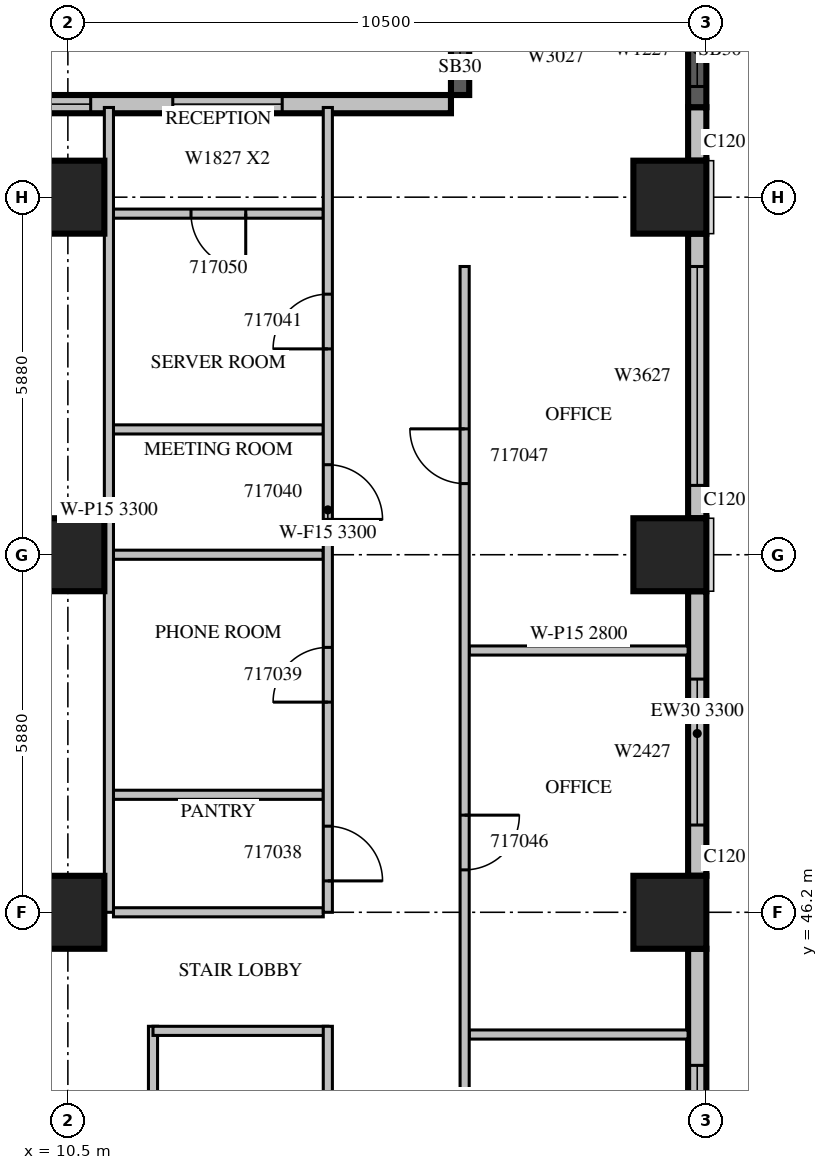
"""IFC4 building model, lengths in metres.
Left out: names, types, materials, properties, quantities, classifications, styles, units other than length and angle.
Written with IfcOpenShell. Run it as: python <this file> out.ifc"""

import sys

from ifc_helpers import new_model, si_unit, direction, frame, frame_2d, origin, origin_2d, place, context, subcontext, project, spatial, rectangle, extrude, source, transform, mapped, element, fill, save


model = new_model("IFC4")
c1 = context("Model", 3, precision=1e-05, world=origin(), true_north=direction((0.0, 1.0)))
c2 = subcontext(c1, "Body", "Model", "MODEL_VIEW")
j1 = project(units=[si_unit("LENGTHUNIT", "METRE"), si_unit("PLANEANGLEUNIT", "RADIAN")], contexts=[c1])
p1 = place(None, origin())
s1 = spatial("IfcSite", under=j1, at=p1, CompositionType="ELEMENT")
p2 = place(p1, origin())
s2 = spatial("IfcBuilding", under=s1, at=p2, CompositionType="ELEMENT")
p3 = place(p2, frame((0.0, 0.0, 82.5)))
s3 = spatial("IfcBuildingStorey", under=s2, at=p3, CompositionType="ELEMENT", Elevation=82.5)
m1 = source(origin(), c2, "Body", "SweptSolid", [
    extrude(rectangle(XDim=1.2, YDim=1.2, at=origin_2d()), origin(), (0.0, 0.0, 1.0), 4.2),
])
for number, where, z_axis, x_axis in (
    (1, (10.5, 46.2, 0.0), (0.0, 0.0, 1.0), (1.0, 0.0, 0.0)),
    (2, (20.4, 46.2, 0.0), (0.0, 0.0, 1.0), (1.0, 0.0, 0.0)),
    (3, (10.5, 52.08, 0.0), (0.0, 0.0, 1.0), (1.0, 0.0, 0.0)),
    (4, (20.4, 52.08, 0.0), (0.0, 0.0, 1.0), (1.0, 0.0, 0.0)),
    (5, (10.5, 57.96, 0.0), (0.0, 0.0, 1.0), (1.0, 0.0, 0.0)),
    (6, (20.4, 57.96, 0.0), (0.0, 0.0, 1.0), (1.0, 0.0, 0.0)),
):
    element("IfcColumn", number, at=place(p3, frame(where, z_axis=z_axis, x_axis=x_axis)), inside=s3, PredefinedType="COLUMN", context=c2, shape_type="MappedRepresentation", body=[
        mapped(m1, transform((0.0, 0.0, 0.0), scale=1.0)),
    ])
m2 = source(origin(), c2, "Body", "SweptSolid", [
    extrude(rectangle(XDim=7.2, YDim=0.3, at=frame_2d((3.6, 0.0))), origin(), (0.0, 0.0, 1.0), 3.8),
])
p4 = place(p3, frame((20.85, 38.4, 0.0), z_axis=(0.0, 0.0, 1.0), x_axis=(0.0, 1.0, 0.0)))
e7 = element("IfcWall", 7, at=p4, inside=s3, PredefinedType="STANDARD", context=c2, shape_type="MappedRepresentation", body=[
    mapped(m2, transform((0.0, 0.0, 0.0), scale=1.0)),
])
m3 = source(origin(), c2, "Body", "SweptSolid", [
    extrude(rectangle(XDim=2.4, YDim=2.7, at=frame_2d((1.2, 1.35))), frame((0.0, 0.16, 0.0), z_axis=(0.0, -1.0, 0.0), x_axis=(1.0, 0.0, 0.0)), (0.0, 0.0, 1.0), 0.32),
])
p5 = place(p4, frame((0.3, 0.0, 0.6)))
e8 = element("IfcOpeningElement", 8, at=p5, cuts=e7, PredefinedType="OPENING", context=c2, shape_type="MappedRepresentation", body=[
    mapped(m3, transform((0.0, 0.0, 0.0), scale=1.0)),
])
m4 = source(origin(), c2, "Body", "SweptSolid", [
    extrude(rectangle(XDim=1.2, YDim=2.7, at=frame_2d((0.6, 1.35))), frame((0.0, 0.16, 0.0), z_axis=(0.0, -1.0, 0.0), x_axis=(1.0, 0.0, 0.0)), (0.0, 0.0, 1.0), 0.32),
])
p6 = place(p4, frame((4.082, 0.0, 0.6)))
e9 = element("IfcOpeningElement", 9, at=p6, cuts=e7, PredefinedType="OPENING", context=c2, shape_type="MappedRepresentation", body=[
    mapped(m4, transform((0.0, 0.0, 0.0), scale=1.0)),
])
m5 = source(origin(), c2, "Body", "SweptSolid", [
    extrude(rectangle(XDim=4.68, YDim=0.3, at=frame_2d((2.34, 0.0))), origin(), (0.0, 0.0, 1.0), 3.3),
])
p7 = place(p3, frame((20.85, 46.8, 0.0), z_axis=(0.0, 0.0, 1.0), x_axis=(0.0, 1.0, 0.0)))
e10 = element("IfcWall", 10, at=p7, inside=s3, PredefinedType="STANDARD", context=c2, shape_type="MappedRepresentation", body=[
    mapped(m5, transform((0.0, 0.0, 0.0), scale=1.0)),
])
p8 = place(p7, frame((0.835, 0.0, 0.6)))
e11 = element("IfcOpeningElement", 11, at=p8, cuts=e10, PredefinedType="OPENING", context=c2, shape_type="MappedRepresentation", body=[
    mapped(m3, transform((0.0, 0.0, 0.0), scale=1.0)),
])
m6 = source(origin(), c2, "Body", "SweptSolid", [
    extrude(rectangle(XDim=4.68, YDim=0.3, at=frame_2d((2.34, 0.0))), origin(), (0.0, 0.0, 1.0), 3.8),
])
p9 = place(p3, frame((20.85, 52.68, 0.0), z_axis=(0.0, 0.0, 1.0), x_axis=(0.0, 1.0, 0.0)))
e12 = element("IfcWall", 12, at=p9, inside=s3, PredefinedType="STANDARD", context=c2, shape_type="MappedRepresentation", body=[
    mapped(m6, transform((0.0, 0.0, 0.0), scale=1.0)),
])
m7 = source(origin(), c2, "Body", "SweptSolid", [
    extrude(rectangle(XDim=3.6, YDim=2.7, at=frame_2d((1.8, 1.35))), frame((0.0, 0.16, 0.0), z_axis=(0.0, -1.0, 0.0), x_axis=(1.0, 0.0, 0.0)), (0.0, 0.0, 1.0), 0.32),
])
p10 = place(p9, frame((0.54, 0.0, 0.6)))
e13 = element("IfcOpeningElement", 13, at=p10, cuts=e12, PredefinedType="OPENING", context=c2, shape_type="MappedRepresentation", body=[
    mapped(m7, transform((0.0, 0.0, 0.0), scale=1.0)),
])
m8 = source(origin(), c2, "Body", "SweptSolid", [
    extrude(rectangle(XDim=0.88, YDim=0.3, at=frame_2d((0.44, 0.0))), origin(), (0.0, 0.0, 1.0), 3.8),
])
p11 = place(p3, frame((20.85, 58.56, 0.0), z_axis=(0.0, 0.0, 1.0), x_axis=(0.0, 1.0, 0.0)))
e14 = element("IfcWall", 14, at=p11, inside=s3, PredefinedType="STANDARD", context=c2, shape_type="MappedRepresentation", body=[
    mapped(m8, transform((0.0, 0.0, 0.0), scale=1.0)),
])
m9 = source(origin(), c2, "Body", "SweptSolid", [
    extrude(rectangle(XDim=1.88, YDim=0.3, at=frame_2d((0.94, 0.0))), origin(), (0.0, 0.0, 1.0), 3.8),
])
p12 = place(p3, frame((20.85, 59.44, 0.0), z_axis=(0.0, 0.0, 1.0), x_axis=(0.0, 1.0, 0.0)))
e15 = element("IfcWall", 15, at=p12, inside=s3, PredefinedType="SOLIDWALL", context=c2, shape_type="MappedRepresentation", body=[
    mapped(m9, transform((0.0, 0.0, 0.0), scale=1.0)),
])
p13 = place(p12, frame((0.34, 0.0, 0.6)))
e16 = element("IfcOpeningElement", 16, at=p13, cuts=e15, PredefinedType="OPENING", context=c2, shape_type="MappedRepresentation", body=[
    mapped(m4, transform((0.0, 0.0, 0.0), scale=1.0)),
])
m10 = source(origin(), c2, "Body", "SweptSolid", [
    extrude(rectangle(XDim=1.68, YDim=0.3, at=frame_2d((0.84, 0.0))), origin(), (0.0, 0.0, 1.0), 3.8),
])
p14 = place(p3, frame((16.95, 61.32, 0.0), z_axis=(0.0, 0.0, 1.0), x_axis=(0.0, -1.0, 0.0)))
e17 = element("IfcWall", 17, at=p14, inside=s3, PredefinedType="SOLIDWALL", context=c2, shape_type="MappedRepresentation", body=[
    mapped(m10, transform((0.0, 0.0, 0.0), scale=1.0)),
])
m11 = source(origin(), c2, "Body", "SweptSolid", [
    extrude(rectangle(XDim=0.9, YDim=2.7, at=frame_2d((0.45, 1.35))), frame((0.0, 0.16, 0.0), z_axis=(0.0, -1.0, 0.0), x_axis=(1.0, 0.0, 0.0)), (0.0, 0.0, 1.0), 0.32),
])
p15 = place(p14, frame((0.39, 0.0, 0.6)))
e18 = element("IfcOpeningElement", 18, at=p15, cuts=e17, PredefinedType="OPENING", context=c2, shape_type="MappedRepresentation", body=[
    mapped(m11, transform((0.0, 0.0, 0.0), scale=1.0)),
])
m12 = source(origin(), c2, "Body", "SweptSolid", [
    extrude(rectangle(XDim=8.4, YDim=0.3, at=frame_2d((4.2, 0.0))), origin(), (0.0, 0.0, 1.0), 3.8),
])
p16 = place(p3, frame((16.8, 59.49, 0.0), z_axis=(0.0, 0.0, 1.0), x_axis=(-1.0, 0.0, 0.0)))
e19 = element("IfcWall", 19, at=p16, inside=s3, PredefinedType="STANDARD", context=c2, shape_type="MappedRepresentation", body=[
    mapped(m12, transform((0.0, 0.0, 0.0), scale=1.0)),
])
m13 = source(origin(), c2, "Body", "SweptSolid", [
    extrude(rectangle(XDim=1.8, YDim=2.7, at=frame_2d((0.9, 1.35))), frame((0.0, 0.16, 0.0), z_axis=(0.0, -1.0, 0.0), x_axis=(1.0, 0.0, 0.0)), (0.0, 0.0, 1.0), 0.32),
])
p17 = place(p16, frame((2.775, 0.0, 0.6)))
e20 = element("IfcOpeningElement", 20, at=p17, cuts=e19, PredefinedType="OPENING", context=c2, shape_type="MappedRepresentation", body=[
    mapped(m13, transform((0.0, 0.0, 0.0), scale=1.0)),
])
p18 = place(p16, frame((5.925, 0.0, 0.6)))
e21 = element("IfcOpeningElement", 21, at=p18, cuts=e19, PredefinedType="OPENING", context=c2, shape_type="MappedRepresentation", body=[
    mapped(m13, transform((0.0, 0.0, 0.0), scale=1.0)),
])
m14 = source(origin(), c2, "Body", "SweptSolid", [
    extrude(rectangle(XDim=6.45, YDim=0.15, at=frame_2d((3.225, 0.0))), origin(), (0.0, 0.0, 1.0), 3.8),
])
p19 = place(p3, frame((11.9, 44.325, 0.0), z_axis=(0.0, 0.0, 1.0), x_axis=(0.0, -1.0, 0.0)))
e22 = element("IfcWall", 22, at=p19, inside=s3, PredefinedType="PARTITIONING", context=c2, shape_type="MappedRepresentation", body=[
    mapped(m14, transform((0.0, 0.0, 0.0), scale=1.0)),
])
m15 = source(origin(), c2, "Body", "SweptSolid", [
    extrude(rectangle(XDim=2.875, YDim=0.15, at=frame_2d((1.438, 0.0))), origin(), (0.0, 0.0, 1.0), 3.8),
])
p20 = place(p3, frame((14.775, 44.25, 0.0), z_axis=(0.0, 0.0, 1.0), x_axis=(-1.0, 0.0, 0.0)))
e23 = element("IfcWall", 23, at=p20, inside=s3, PredefinedType="PARTITIONING", context=c2, shape_type="MappedRepresentation", body=[
    mapped(m15, transform((0.0, 0.0, 0.0), scale=1.0)),
])
p21 = place(p3, frame((14.775, 37.875, 0.0), z_axis=(0.0, 0.0, 1.0), x_axis=(0.0, 1.0, 0.0)))
e24 = element("IfcWall", 24, at=p21, inside=s3, PredefinedType="PARTITIONING", context=c2, shape_type="MappedRepresentation", body=[
    mapped(m14, transform((0.0, 0.0, 0.0), scale=1.0)),
])
m16 = source(origin(), c2, "Body", "SweptSolid", [
    extrude(rectangle(XDim=0.9, YDim=2.1, at=frame_2d((0.45, 1.05))), frame((0.0, 0.085, 0.0), z_axis=(0.0, -1.0, 0.0), x_axis=(1.0, 0.0, 0.0)), (0.0, 0.0, 1.0), 0.17),
])
p22 = place(p21, frame((2.737, 0.0, 0.0)))
e25 = element("IfcOpeningElement", 25, at=p22, cuts=e24, PredefinedType="OPENING", context=c2, shape_type="MappedRepresentation", body=[
    mapped(m16, transform((0.0, 0.0, 0.0), scale=1.0)),
])
m17 = source(origin(), c2, "Body", "SweptSolid", [
    extrude(rectangle(XDim=3.45, YDim=0.15, at=frame_2d((1.725, 0.0))), origin(), (0.0, 0.0, 1.0), 3.8),
])
for number, where, z_axis, x_axis in (
    (26, (14.7, 48.132, 0.0), (0.0, 0.0, 1.0), (-1.0, 0.0, 0.0)),
    (27, (14.7, 52.08, 0.0), (0.0, 0.0, 1.0), (-1.0, 0.0, 0.0)),
    (28, (14.7, 54.141, 0.0), (0.0, 0.0, 1.0), (-1.0, 0.0, 0.0)),
):
    element("IfcWall", number, at=place(p3, frame(where, z_axis=z_axis, x_axis=x_axis)), inside=s3, PredefinedType="PARTITIONING", context=c2, shape_type="MappedRepresentation", body=[
        mapped(m17, transform((0.0, 0.0, 0.0), scale=1.0)),
    ])
p23 = place(p3, frame((14.7, 57.689, 0.0), z_axis=(0.0, 0.0, 1.0), x_axis=(-1.0, 0.0, 0.0)))
e29 = element("IfcWall", 29, at=p23, inside=s3, PredefinedType="PARTITIONING", context=c2, shape_type="MappedRepresentation", body=[
    mapped(m17, transform((0.0, 0.0, 0.0), scale=1.0)),
])
p24 = place(p23, frame((1.275, 0.0, 0.0)))
e30 = element("IfcOpeningElement", 30, at=p24, cuts=e29, PredefinedType="OPENING", context=c2, shape_type="MappedRepresentation", body=[
    mapped(m16, transform((0.0, 0.0, 0.0), scale=1.0)),
])
p25 = place(p3, frame((14.7, 46.2, 0.0), z_axis=(0.0, 0.0, 1.0), x_axis=(-1.0, 0.0, 0.0)))
e31 = element("IfcWall", 31, at=p25, inside=s3, PredefinedType="PARTITIONING", context=c2, shape_type="MappedRepresentation", body=[
    mapped(m17, transform((0.0, 0.0, 0.0), scale=1.0)),
])
p26 = place(p3, frame((11.175, 46.2, 0.0), z_axis=(0.0, 0.0, 1.0), x_axis=(0.0, 1.0, 0.0)))
e32 = element("IfcWall", 32, at=p26, inside=s3, PredefinedType="PARTITIONING", context=c2, shape_type="SweptSolid", body=[
    extrude(rectangle(XDim=13.235, YDim=0.15, at=frame_2d((6.617, 0.0))), origin(), (0.0, 0.0, 1.0), 3.3),
])
m18 = source(origin(), c2, "Body", "SweptSolid", [
    extrude(rectangle(XDim=3.6, YDim=0.15, at=frame_2d((1.8, 0.0))), origin(), (0.0, 0.0, 1.0), 3.8),
])
p27 = place(p3, frame((17.1, 44.19, 0.0), z_axis=(0.0, 0.0, 1.0), x_axis=(1.0, 0.0, 0.0)))
e33 = element("IfcWall", 33, at=p27, inside=s3, PredefinedType="PARTITIONING", context=c2, shape_type="MappedRepresentation", body=[
    mapped(m18, transform((0.0, 0.0, 0.0), scale=1.0)),
])
m19 = source(origin(), c2, "Body", "SweptSolid", [
    extrude(rectangle(XDim=3.6, YDim=0.15, at=frame_2d((1.8, 0.0))), origin(), (0.0, 0.0, 1.0), 2.8),
])
p28 = place(p3, frame((17.1, 50.505, 0.0), z_axis=(0.0, 0.0, 1.0), x_axis=(1.0, 0.0, 0.0)))
e34 = element("IfcWall", 34, at=p28, inside=s3, PredefinedType="PARTITIONING", context=c2, shape_type="MappedRepresentation", body=[
    mapped(m19, transform((0.0, 0.0, 0.0), scale=1.0)),
])
m20 = source(origin(), c2, "Body", "SweptSolid", [
    extrude(rectangle(XDim=13.235, YDim=0.15, at=frame_2d((6.617, 0.0))), origin(), (0.0, 0.0, 1.0), 3.3),
])
p29 = place(p3, frame((14.775, 46.2, 0.0), z_axis=(0.0, 0.0, 1.0), x_axis=(0.0, 1.0, 0.0)))
e35 = element("IfcWall", 35, at=p29, inside=s3, PredefinedType="PARTITIONING", context=c2, shape_type="MappedRepresentation", body=[
    mapped(m20, transform((0.0, 0.0, 0.0), scale=1.0)),
])
p30 = place(p29, frame((0.516, 0.0, 0.0)))
e36 = element("IfcOpeningElement", 36, at=p30, cuts=e35, PredefinedType="OPENING", context=c2, shape_type="MappedRepresentation", body=[
    mapped(m16, transform((0.0, 0.0, 0.0), scale=1.0)),
])
p31 = place(p29, frame((3.456, 0.0, 0.0)))
e37 = element("IfcOpeningElement", 37, at=p31, cuts=e35, PredefinedType="OPENING", context=c2, shape_type="MappedRepresentation", body=[
    mapped(m16, transform((0.0, 0.0, 0.0), scale=1.0)),
])
p32 = place(p29, frame((6.46, 0.0, 0.0)))
e38 = element("IfcOpeningElement", 38, at=p32, cuts=e35, PredefinedType="OPENING", context=c2, shape_type="MappedRepresentation", body=[
    mapped(m16, transform((0.0, 0.0, 0.0), scale=1.0)),
])
p33 = place(p29, frame((9.265, 0.0, 0.0)))
e39 = element("IfcOpeningElement", 39, at=p33, cuts=e35, PredefinedType="OPENING", context=c2, shape_type="MappedRepresentation", body=[
    mapped(m16, transform((0.0, 0.0, 0.0), scale=1.0)),
])
p34 = place(p3, frame((17.025, 56.82, 0.0), z_axis=(0.0, 0.0, 1.0), x_axis=(0.0, -1.0, 0.0)))
e40 = element("IfcWall", 40, at=p34, inside=s3, PredefinedType="PARTITIONING", context=c2, shape_type="SweptSolid", body=[
    extrude(rectangle(XDim=27.42, YDim=0.15, at=frame_2d((13.71, 0.0))), origin(), (0.0, 0.0, 1.0), 3.3),
])
m21 = source(origin(), c2, "Body", "SweptSolid", [
    extrude(rectangle(XDim=1.0, YDim=2.1, at=frame_2d((0.5, 1.05))), frame((0.0, 0.085, 0.0), z_axis=(0.0, -1.0, 0.0), x_axis=(1.0, 0.0, 0.0)), (0.0, 0.0, 1.0), 0.17),
])
p35 = place(p34, frame((25.063, 0.0, 0.0)))
e41 = element("IfcOpeningElement", 41, at=p35, cuts=e40, PredefinedType="OPENING", context=c2, shape_type="MappedRepresentation", body=[
    mapped(m21, transform((0.0, 0.0, 0.0), scale=1.0)),
])
p36 = place(p34, frame((21.751, 0.0, 0.0)))
e42 = element("IfcOpeningElement", 42, at=p36, cuts=e40, PredefinedType="OPENING", context=c2, shape_type="MappedRepresentation", body=[
    mapped(m21, transform((0.0, 0.0, 0.0), scale=1.0)),
])
p37 = place(p34, frame((19.408, 0.0, 0.0)))
e43 = element("IfcOpeningElement", 43, at=p37, cuts=e40, PredefinedType="OPENING", context=c2, shape_type="MappedRepresentation", body=[
    mapped(m21, transform((0.0, 0.0, 0.0), scale=1.0)),
])
p38 = place(p34, frame((15.375, 0.0, 0.0)))
e44 = element("IfcOpeningElement", 44, at=p38, cuts=e40, PredefinedType="OPENING", context=c2, shape_type="MappedRepresentation", body=[
    mapped(m16, transform((0.0, 0.0, 0.0), scale=1.0)),
])
p39 = place(p34, frame((9.023, 0.0, 0.0)))
e45 = element("IfcOpeningElement", 45, at=p39, cuts=e40, PredefinedType="OPENING", context=c2, shape_type="MappedRepresentation", body=[
    mapped(m16, transform((0.0, 0.0, 0.0), scale=1.0)),
])
p40 = place(p34, frame((2.67, 0.0, 0.0)))
e46 = element("IfcOpeningElement", 46, at=p40, cuts=e40, PredefinedType="OPENING", context=c2, shape_type="MappedRepresentation", body=[
    mapped(m16, transform((0.0, 0.0, 0.0), scale=1.0)),
])
m22 = source(origin(), c2, "Body", "SweptSolid", [
    extrude(rectangle(XDim=1.2, YDim=2.7, at=frame_2d((0.6, 1.35))), frame((0.0, 0.03, 0.0), z_axis=(0.0, -1.0, 0.0), x_axis=(1.0, 0.0, 0.0)), (0.0, 0.0, 1.0), 0.06),
])
p41 = place(p6, origin())
e47 = element("IfcWindow", 47, at=p41, inside=s3, PartitioningType="SINGLE_PANEL", PredefinedType="WINDOW", context=c2, shape_type="MappedRepresentation", body=[
    mapped(m22, transform((0.0, 0.0, 0.0), scale=1.0)),
])
fill(e9, e47)
m23 = source(origin(), c2, "Body", "SweptSolid", [
    extrude(rectangle(XDim=2.4, YDim=2.7, at=frame_2d((1.2, 1.35))), frame((0.0, 0.03, 0.0), z_axis=(0.0, -1.0, 0.0), x_axis=(1.0, 0.0, 0.0)), (0.0, 0.0, 1.0), 0.06),
])
p42 = place(p8, origin())
e48 = element("IfcWindow", 48, at=p42, inside=s3, PartitioningType="SINGLE_PANEL", PredefinedType="WINDOW", context=c2, shape_type="MappedRepresentation", body=[
    mapped(m23, transform((0.0, 0.0, 0.0), scale=1.0)),
])
fill(e11, e48)
m24 = source(origin(), c2, "Body", "SweptSolid", [
    extrude(rectangle(XDim=3.6, YDim=2.7, at=frame_2d((1.8, 1.35))), frame((0.0, 0.03, 0.0), z_axis=(0.0, -1.0, 0.0), x_axis=(1.0, 0.0, 0.0)), (0.0, 0.0, 1.0), 0.06),
])
p43 = place(p10, origin())
e49 = element("IfcWindow", 49, at=p43, inside=s3, PartitioningType="SINGLE_PANEL", PredefinedType="WINDOW", context=c2, shape_type="MappedRepresentation", body=[
    mapped(m24, transform((0.0, 0.0, 0.0), scale=1.0)),
])
fill(e13, e49)
p44 = place(p13, origin())
e50 = element("IfcWindow", 50, at=p44, inside=s3, PartitioningType="SINGLE_PANEL", PredefinedType="WINDOW", context=c2, shape_type="MappedRepresentation", body=[
    mapped(m22, transform((0.0, 0.0, 0.0), scale=1.0)),
])
fill(e16, e50)
m25 = source(origin(), c2, "Body", "SweptSolid", [
    extrude(rectangle(XDim=0.9, YDim=2.7, at=frame_2d((0.45, 1.35))), frame((0.0, 0.03, 0.0), z_axis=(0.0, -1.0, 0.0), x_axis=(1.0, 0.0, 0.0)), (0.0, 0.0, 1.0), 0.06),
])
p45 = place(p15, origin())
e51 = element("IfcWindow", 51, at=p45, inside=s3, PartitioningType="SINGLE_PANEL", PredefinedType="WINDOW", context=c2, shape_type="MappedRepresentation", body=[
    mapped(m25, transform((0.0, 0.0, 0.0), scale=1.0)),
])
fill(e18, e51)
m26 = source(origin(), c2, "Body", "SweptSolid", [
    extrude(rectangle(XDim=1.8, YDim=2.7, at=frame_2d((0.9, 1.35))), frame((0.0, 0.03, 0.0), z_axis=(0.0, -1.0, 0.0), x_axis=(1.0, 0.0, 0.0)), (0.0, 0.0, 1.0), 0.06),
])
p46 = place(p17, origin())
e52 = element("IfcWindow", 52, at=p46, inside=s3, PartitioningType="SINGLE_PANEL", PredefinedType="WINDOW", context=c2, shape_type="MappedRepresentation", body=[
    mapped(m26, transform((0.0, 0.0, 0.0), scale=1.0)),
])
fill(e20, e52)
p47 = place(p18, origin())
e53 = element("IfcWindow", 53, at=p47, inside=s3, PartitioningType="SINGLE_PANEL", PredefinedType="WINDOW", context=c2, shape_type="MappedRepresentation", body=[
    mapped(m26, transform((0.0, 0.0, 0.0), scale=1.0)),
])
fill(e21, e53)
m27 = source(origin(), c2, "Body", "SweptSolid", [
    extrude(rectangle(XDim=0.9, YDim=2.1, at=frame_2d((0.45, 1.05))), frame((0.0, 0.025, 0.0), z_axis=(0.0, -1.0, 0.0), x_axis=(1.0, 0.0, 0.0)), (0.0, 0.0, 1.0), 0.05),
])
p48 = place(p30, origin())
e54 = element("IfcDoor", 54, at=p48, inside=s3, OperationType="SINGLE_SWING_RIGHT", PredefinedType="DOOR", context=c2, shape_type="MappedRepresentation", body=[
    mapped(m27, transform((0.0, 0.0, 0.0), scale=1.0)),
])
fill(e36, e54)
p49 = place(p31, origin())
e55 = element("IfcDoor", 55, at=p49, inside=s3, OperationType="SINGLE_SWING_LEFT", PredefinedType="DOOR", context=c2, shape_type="MappedRepresentation", body=[
    mapped(m27, transform((0.0, 0.0, 0.0), scale=1.0)),
])
fill(e37, e55)
p50 = place(p32, origin())
e56 = element("IfcDoor", 56, at=p50, inside=s3, OperationType="SINGLE_SWING_RIGHT", PredefinedType="DOOR", context=c2, shape_type="MappedRepresentation", body=[
    mapped(m27, transform((0.0, 0.0, 0.0), scale=1.0)),
])
fill(e38, e56)
p51 = place(p33, origin())
e57 = element("IfcDoor", 57, at=p51, inside=s3, OperationType="SINGLE_SWING_LEFT", PredefinedType="DOOR", context=c2, shape_type="MappedRepresentation", body=[
    mapped(m27, transform((0.0, 0.0, 0.0), scale=1.0)),
])
fill(e39, e57)
p52 = place(p39, origin())
e58 = element("IfcDoor", 58, at=p52, inside=s3, OperationType="SINGLE_SWING_LEFT", PredefinedType="DOOR", context=c2, shape_type="MappedRepresentation", body=[
    mapped(m27, transform((0.0, 0.0, 0.0), scale=1.0)),
])
fill(e45, e58)
p53 = place(p40, origin())
e59 = element("IfcDoor", 59, at=p53, inside=s3, OperationType="SINGLE_SWING_RIGHT", PredefinedType="DOOR", context=c2, shape_type="MappedRepresentation", body=[
    mapped(m27, transform((0.0, 0.0, 0.0), scale=1.0)),
])
fill(e46, e59)
p54 = place(p24, origin())
e60 = element("IfcDoor", 60, at=p54, inside=s3, OperationType="SINGLE_SWING_LEFT", PredefinedType="DOOR", context=c2, shape_type="MappedRepresentation", body=[
    mapped(m27, transform((0.0, 0.0, 0.0), scale=1.0)),
])
fill(e30, e60)
save(model, sys.argv[1])
